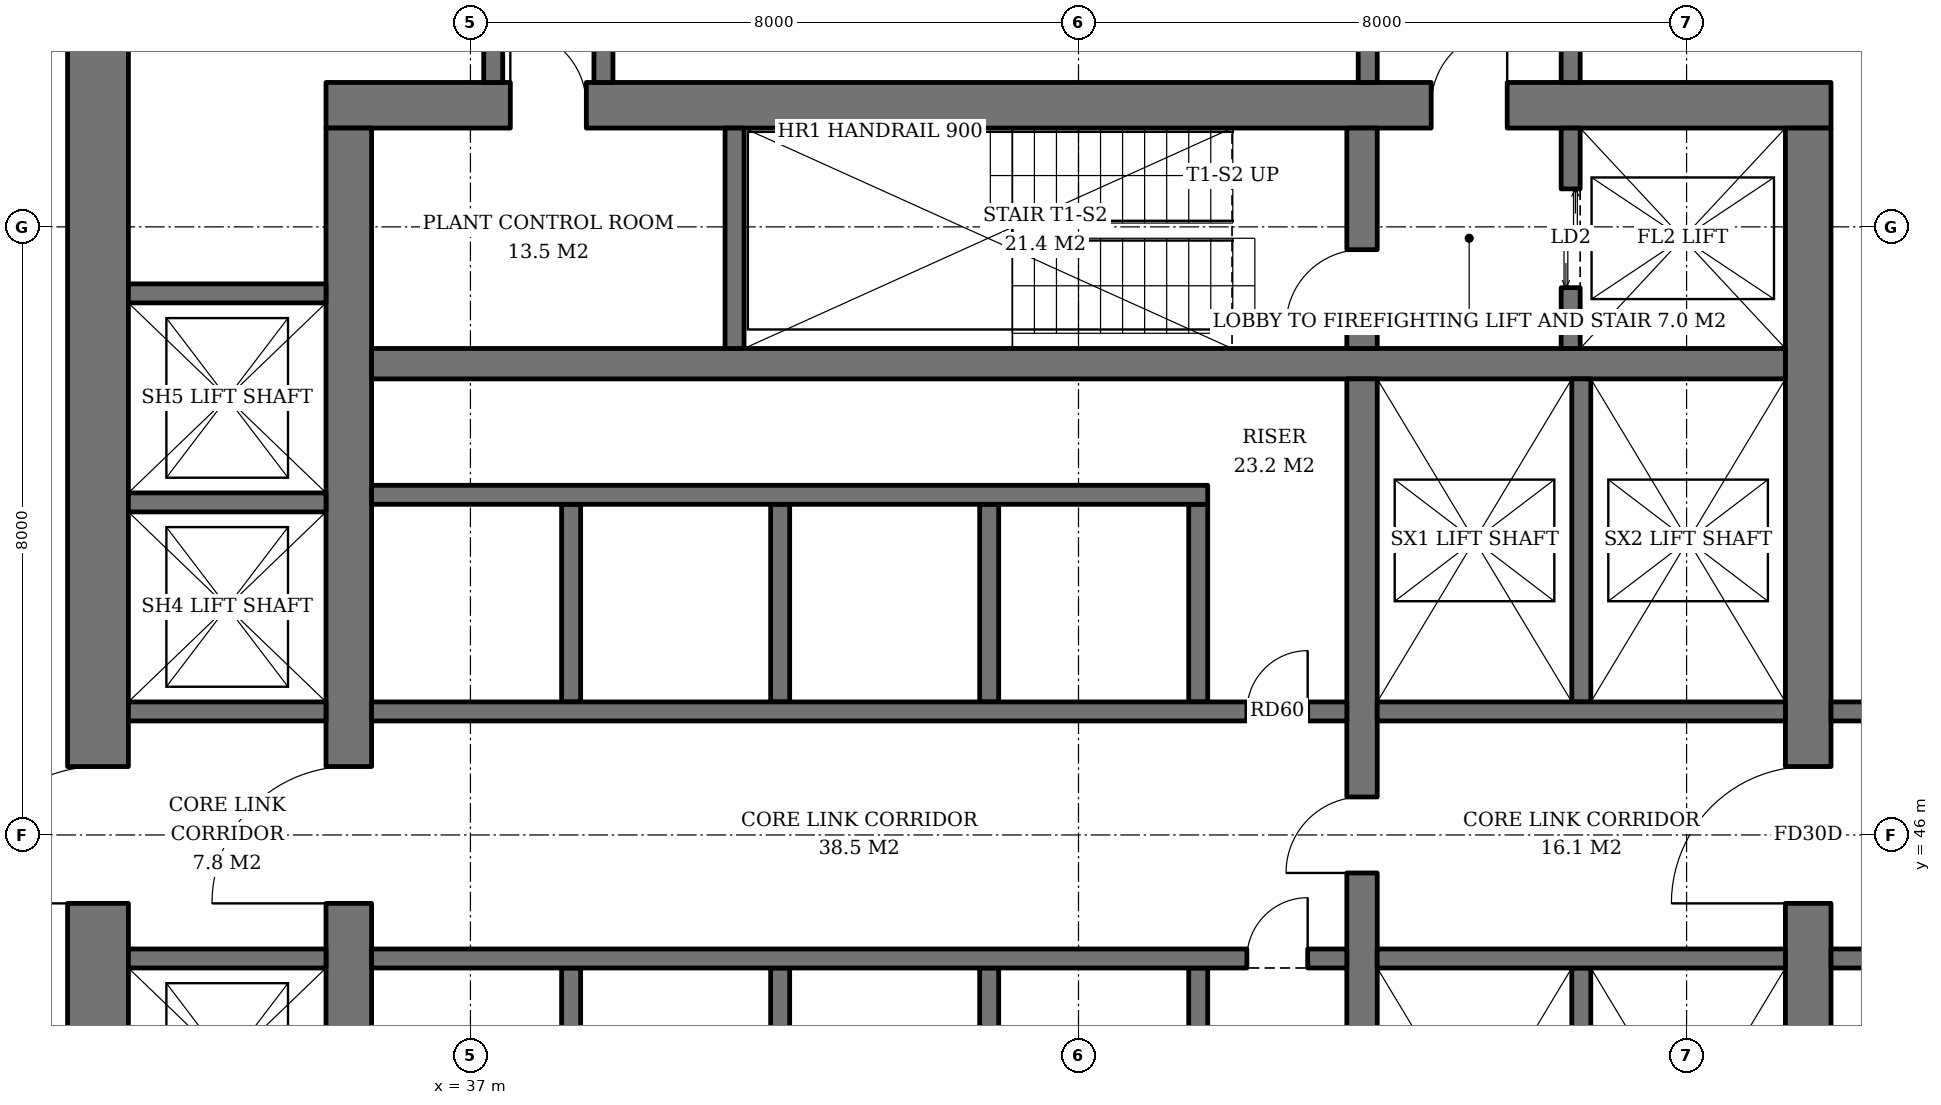
"""IFC4 building model, lengths in metres.
Left out: names, types, materials, properties, quantities, classifications, styles, units other than length and angle.
Written with IfcOpenShell. Run it as: python <this file> out.ifc"""

import sys

from ifc_helpers import new_model, si_unit, direction, frame, frame_2d, origin, place, context, subcontext, project, spatial, rectangle, extrude, element, fill, save


model = new_model("IFC4")
c1 = context("Model", 3, precision=1e-05, world=origin(), true_north=direction((0.0, 1.0)))
c2 = subcontext(c1, "Body", "Model", "MODEL_VIEW")
j1 = project(units=[si_unit("LENGTHUNIT", "METRE"), si_unit("PLANEANGLEUNIT", "RADIAN")], contexts=[c1])
p1 = place(None, origin())
s1 = spatial("IfcSite", under=j1, at=p1, CompositionType="ELEMENT")
p2 = place(p1, origin())
s2 = spatial("IfcBuilding", under=s1, at=p2, CompositionType="ELEMENT")
p3 = place(p2, frame((0.0, 0.0, 85.6)))
s3 = spatial("IfcBuildingStorey", under=s2, at=p3, CompositionType="ELEMENT", Elevation=85.6)
p4 = place(p3, frame((35.1, 55.6, 0.0), z_axis=(0.0, 0.0, 1.0), x_axis=(1.0, 0.0, 0.0)))
e1 = element("IfcWall", 1, at=p4, inside=s3, PredefinedType="SHEAR", context=c2, shape_type="SweptSolid", body=[
    extrude(rectangle(XDim=19.8, YDim=0.6, at=frame_2d((9.9, 0.0))), origin(), (0.0, 0.0, 1.0), 3.8),
])
p5 = place(p4, frame((14.54, 0.0, 0.0)))
e2 = element("IfcOpeningElement", 2, at=p5, cuts=e1, PredefinedType="OPENING", context=c2, shape_type="SweptSolid", body=[
    extrude(rectangle(XDim=1.0, YDim=2.1, at=frame_2d((0.5, 1.05))), frame((0.0, 0.31, 0.0), z_axis=(0.0, -1.0, 0.0), x_axis=(1.0, 0.0, 0.0)), (0.0, 0.0, 1.0), 0.62),
])
p6 = place(p4, frame((2.425, 0.0, 0.0)))
e3 = element("IfcOpeningElement", 3, at=p6, cuts=e1, PredefinedType="OPENING", context=c2, shape_type="SweptSolid", body=[
    extrude(rectangle(XDim=1.0, YDim=2.1, at=frame_2d((0.5, 1.05))), frame((0.0, 0.31, 0.0), z_axis=(0.0, -1.0, 0.0), x_axis=(1.0, 0.0, 0.0)), (0.0, 0.0, 1.0), 0.62),
])
p7 = place(p3, frame((35.4, 36.7, 0.0), z_axis=(0.0, 0.0, 1.0), x_axis=(0.0, 1.0, 0.0)))
e4 = element("IfcWall", 4, at=p7, inside=s3, PredefinedType="SHEAR", context=c2, shape_type="SweptSolid", body=[
    extrude(rectangle(XDim=18.6, YDim=0.6, at=frame_2d((9.3, 0.0))), origin(), (0.0, 0.0, 1.0), 3.8),
])
p8 = place(p7, frame((8.4, 0.0, 0.0)))
e5 = element("IfcOpeningElement", 5, at=p8, cuts=e4, PredefinedType="OPENING", context=c2, shape_type="SweptSolid", body=[
    extrude(rectangle(XDim=1.8, YDim=2.4, at=frame_2d((0.9, 1.2))), frame((0.0, 0.31, 0.0), z_axis=(0.0, -1.0, 0.0), x_axis=(1.0, 0.0, 0.0)), (0.0, 0.0, 1.0), 0.62),
])
p9 = place(p3, frame((54.6, 36.7, 0.0), z_axis=(0.0, 0.0, 1.0), x_axis=(0.0, 1.0, 0.0)))
e6 = element("IfcWall", 6, at=p9, inside=s3, PredefinedType="SHEAR", context=c2, shape_type="SweptSolid", body=[
    extrude(rectangle(XDim=18.6, YDim=0.6, at=frame_2d((9.3, 0.0))), origin(), (0.0, 0.0, 1.0), 3.8),
])
p10 = place(p9, frame((8.4, 0.0, 0.0)))
e7 = element("IfcOpeningElement", 7, at=p10, cuts=e6, PredefinedType="OPENING", context=c2, shape_type="SweptSolid", body=[
    extrude(rectangle(XDim=1.8, YDim=2.4, at=frame_2d((0.9, 1.2))), frame((0.0, 0.31, 0.0), z_axis=(0.0, -1.0, 0.0), x_axis=(1.0, 0.0, 0.0)), (0.0, 0.0, 1.0), 0.62),
])
p11 = place(p3, frame((32.1, 33.5, 0.0), z_axis=(0.0, 0.0, 1.0), x_axis=(0.0, 1.0, 0.0)))
e8 = element("IfcWall", 8, at=p11, inside=s3, PredefinedType="SHEAR", context=c2, shape_type="SweptSolid", body=[
    extrude(rectangle(XDim=25.0, YDim=0.8, at=frame_2d((12.5, 0.0))), origin(), (0.0, 0.0, 1.0), 3.8),
])
p12 = place(p11, frame((11.6, 0.0, 0.0)))
e9 = element("IfcOpeningElement", 9, at=p12, cuts=e8, PredefinedType="OPENING", context=c2, shape_type="SweptSolid", body=[
    extrude(rectangle(XDim=1.8, YDim=2.4, at=frame_2d((0.9, 1.2))), frame((0.0, 0.41, 0.0), z_axis=(0.0, -1.0, 0.0), x_axis=(1.0, 0.0, 0.0)), (0.0, 0.0, 1.0), 0.82),
])
p13 = place(p3, frame((35.7, 52.2, 0.0), z_axis=(0.0, 0.0, 1.0), x_axis=(1.0, 0.0, 0.0)))
e10 = element("IfcWall", 10, at=p13, inside=s3, PredefinedType="SHEAR", context=c2, shape_type="SweptSolid", body=[
    extrude(rectangle(XDim=18.6, YDim=0.4, at=frame_2d((9.3, 0.0))), origin(), (0.0, 0.0, 1.0), 3.8),
])
p14 = place(p3, frame((48.73, 40.0, 0.0), z_axis=(0.0, 0.0, 1.0), x_axis=(0.0, 1.0, 0.0)))
e11 = element("IfcWall", 11, at=p14, inside=s3, PredefinedType="SHEAR", context=c2, shape_type="SweptSolid", body=[
    extrude(rectangle(XDim=12.0, YDim=0.4, at=frame_2d((6.0, 0.0))), origin(), (0.0, 0.0, 1.0), 3.8),
])
p15 = place(p14, frame((5.5, 0.0, 0.0)))
e12 = element("IfcOpeningElement", 12, at=p15, cuts=e11, PredefinedType="OPENING", context=c2, shape_type="SweptSolid", body=[
    extrude(rectangle(XDim=1.0, YDim=2.1, at=frame_2d((0.5, 1.05))), frame((0.0, 0.21, 0.0), z_axis=(0.0, -1.0, 0.0), x_axis=(1.0, 0.0, 0.0)), (0.0, 0.0, 1.0), 0.42),
])
p16 = place(p3, frame((48.73, 52.4, 0.0), z_axis=(0.0, 0.0, 1.0), x_axis=(0.0, 1.0, 0.0)))
e13 = element("IfcWall", 13, at=p16, inside=s3, PredefinedType="SHEAR", context=c2, shape_type="SweptSolid", body=[
    extrude(rectangle(XDim=2.9, YDim=0.4, at=frame_2d((1.45, 0.0))), origin(), (0.0, 0.0, 1.0), 3.8),
])
p17 = place(p16, frame((0.3, 0.0, 0.0)))
e14 = element("IfcOpeningElement", 14, at=p17, cuts=e13, PredefinedType="OPENING", context=c2, shape_type="SweptSolid", body=[
    extrude(rectangle(XDim=1.0, YDim=2.1, at=frame_2d((0.5, 1.05))), frame((0.0, 0.21, 0.0), z_axis=(0.0, -1.0, 0.0), x_axis=(1.0, 0.0, 0.0)), (0.0, 0.0, 1.0), 0.42),
])
p18 = place(p3, frame((40.475, 52.4, 0.0), z_axis=(0.0, 0.0, 1.0), x_axis=(0.0, 1.0, 0.0)))
e15 = element("IfcWall", 15, at=p18, inside=s3, PredefinedType="SHEAR", context=c2, shape_type="SweptSolid", body=[
    extrude(rectangle(XDim=2.9, YDim=0.25, at=frame_2d((1.45, 0.0))), origin(), (0.0, 0.0, 1.0), 3.8),
])
p19 = place(p3, frame((51.475, 52.4, 0.0), z_axis=(0.0, 0.0, 1.0), x_axis=(0.0, 1.0, 0.0)))
e16 = element("IfcWall", 16, at=p19, inside=s3, PredefinedType="SHEAR", context=c2, shape_type="SweptSolid", body=[
    extrude(rectangle(XDim=2.9, YDim=0.25, at=frame_2d((1.45, 0.0))), origin(), (0.0, 0.0, 1.0), 3.8),
])
p20 = place(p19, frame((0.8, 0.0, 0.0)))
e17 = element("IfcOpeningElement", 17, at=p20, cuts=e16, PredefinedType="OPENING", context=c2, shape_type="SweptSolid", body=[
    extrude(rectangle(XDim=1.3, YDim=2.2, at=frame_2d((0.65, 1.1))), frame((0.0, 0.135, 0.0), z_axis=(0.0, -1.0, 0.0), x_axis=(1.0, 0.0, 0.0)), (0.0, 0.0, 1.0), 0.27),
])
for number, where, z_axis, x_axis in (
    (18, (38.325, 47.75, 0.0), (0.0, 0.0, 1.0), (0.0, 1.0, 0.0)),
    (19, (41.075, 47.75, 0.0), (0.0, 0.0, 1.0), (0.0, 1.0, 0.0)),
    (20, (43.825, 47.75, 0.0), (0.0, 0.0, 1.0), (0.0, 1.0, 0.0)),
    (21, (46.575, 47.75, 0.0), (0.0, 0.0, 1.0), (0.0, 1.0, 0.0)),
):
    element("IfcWall", number, at=place(p3, frame(where, z_axis=z_axis, x_axis=x_axis)), inside=s3, PredefinedType="SHEAR", context=c2, shape_type="SweptSolid", body=[
        extrude(rectangle(XDim=2.6, YDim=0.25, at=frame_2d((1.3, 0.0))), origin(), (0.0, 0.0, 1.0), 3.8),
    ])
p21 = place(p3, frame((35.7, 50.475, 0.0), z_axis=(0.0, 0.0, 1.0), x_axis=(1.0, 0.0, 0.0)))
e22 = element("IfcWall", 22, at=p21, inside=s3, PredefinedType="SHEAR", context=c2, shape_type="SweptSolid", body=[
    extrude(rectangle(XDim=11.0, YDim=0.25, at=frame_2d((5.5, 0.0))), origin(), (0.0, 0.0, 1.0), 3.8),
])
p22 = place(p3, frame((35.7, 47.625, 0.0), z_axis=(0.0, 0.0, 1.0), x_axis=(1.0, 0.0, 0.0)))
e23 = element("IfcWall", 23, at=p22, inside=s3, PredefinedType="SHEAR", context=c2, shape_type="SweptSolid", body=[
    extrude(rectangle(XDim=12.83, YDim=0.25, at=frame_2d((6.415, 0.0))), origin(), (0.0, 0.0, 1.0), 3.8),
])
p23 = place(p22, frame((11.515, 0.0, 0.0)))
e24 = element("IfcOpeningElement", 24, at=p23, cuts=e23, PredefinedType="OPENING", context=c2, shape_type="SweptSolid", body=[
    extrude(rectangle(XDim=0.8, YDim=2.0, at=frame_2d((0.4, 1.0))), frame((0.0, 0.135, 0.0), z_axis=(0.0, -1.0, 0.0), x_axis=(1.0, 0.0, 0.0)), (0.0, 0.0, 1.0), 0.27),
])
for number, where, z_axis, x_axis in (
    (25, (38.325, 44.25, 0.0), (0.0, 0.0, 1.0), (0.0, -1.0, 0.0)),
    (26, (41.075, 44.25, 0.0), (0.0, 0.0, 1.0), (0.0, -1.0, 0.0)),
    (27, (43.825, 44.25, 0.0), (0.0, 0.0, 1.0), (0.0, -1.0, 0.0)),
    (28, (46.575, 44.25, 0.0), (0.0, 0.0, 1.0), (0.0, -1.0, 0.0)),
):
    element("IfcWall", number, at=place(p3, frame(where, z_axis=z_axis, x_axis=x_axis)), inside=s3, PredefinedType="SHEAR", context=c2, shape_type="SweptSolid", body=[
        extrude(rectangle(XDim=2.6, YDim=0.25, at=frame_2d((1.3, 0.0))), origin(), (0.0, 0.0, 1.0), 3.8),
    ])
p24 = place(p3, frame((35.7, 44.375, 0.0), z_axis=(0.0, 0.0, 1.0), x_axis=(1.0, 0.0, 0.0)))
e29 = element("IfcWall", 29, at=p24, inside=s3, PredefinedType="SHEAR", context=c2, shape_type="SweptSolid", body=[
    extrude(rectangle(XDim=12.83, YDim=0.25, at=frame_2d((6.415, 0.0))), origin(), (0.0, 0.0, 1.0), 3.8),
])
p25 = place(p24, frame((11.515, 0.0, 0.0)))
e30 = element("IfcOpeningElement", 30, at=p25, cuts=e29, PredefinedType="OPENING", context=c2, shape_type="SweptSolid", body=[
    extrude(rectangle(XDim=0.8, YDim=2.0, at=frame_2d((0.4, 1.0))), frame((0.0, 0.135, 0.0), z_axis=(0.0, -1.0, 0.0), x_axis=(1.0, 0.0, 0.0)), (0.0, 0.0, 1.0), 0.27),
])
p26 = place(p3, frame((51.615, 47.75, 0.0), z_axis=(0.0, 0.0, 1.0), x_axis=(0.0, 1.0, 0.0)))
e31 = element("IfcWall", 31, at=p26, inside=s3, PredefinedType="SHEAR", context=c2, shape_type="SweptSolid", body=[
    extrude(rectangle(XDim=4.25, YDim=0.25, at=frame_2d((2.125, 0.0))), origin(), (0.0, 0.0, 1.0), 3.8),
])
p27 = place(p3, frame((48.93, 47.625, 0.0), z_axis=(0.0, 0.0, 1.0), x_axis=(1.0, 0.0, 0.0)))
e32 = element("IfcWall", 32, at=p27, inside=s3, PredefinedType="SHEAR", context=c2, shape_type="SweptSolid", body=[
    extrude(rectangle(XDim=5.37, YDim=0.25, at=frame_2d((2.685, 0.0))), origin(), (0.0, 0.0, 1.0), 3.8),
])
p28 = place(p3, frame((51.615, 44.25, 0.0), z_axis=(0.0, 0.0, 1.0), x_axis=(0.0, -1.0, 0.0)))
e33 = element("IfcWall", 33, at=p28, inside=s3, PredefinedType="SHEAR", context=c2, shape_type="SweptSolid", body=[
    extrude(rectangle(XDim=4.25, YDim=0.25, at=frame_2d((2.125, 0.0))), origin(), (0.0, 0.0, 1.0), 3.8),
])
p29 = place(p3, frame((48.93, 44.375, 0.0), z_axis=(0.0, 0.0, 1.0), x_axis=(1.0, 0.0, 0.0)))
e34 = element("IfcWall", 34, at=p29, inside=s3, PredefinedType="SHEAR", context=c2, shape_type="SweptSolid", body=[
    extrude(rectangle(XDim=5.37, YDim=0.25, at=frame_2d((2.685, 0.0))), origin(), (0.0, 0.0, 1.0), 3.8),
])
for number, where, z_axis, x_axis in (
    (35, (32.5, 44.375, 0.0), (0.0, 0.0, 1.0), (1.0, 0.0, 0.0)),
    (36, (32.5, 47.625, 0.0), (0.0, 0.0, 1.0), (1.0, 0.0, 0.0)),
    (37, (32.5, 50.375, 0.0), (0.0, 0.0, 1.0), (1.0, 0.0, 0.0)),
    (38, (32.5, 53.125, 0.0), (0.0, 0.0, 1.0), (1.0, 0.0, 0.0)),
):
    element("IfcWall", number, at=place(p3, frame(where, z_axis=z_axis, x_axis=x_axis)), inside=s3, PredefinedType="SHEAR", context=c2, shape_type="SweptSolid", body=[
        extrude(rectangle(XDim=2.6, YDim=0.25, at=frame_2d((1.3, 0.0))), origin(), (0.0, 0.0, 1.0), 3.8),
    ])
p30 = place(p3, frame((48.805, 55.9, 0.0), z_axis=(0.0, 0.0, 1.0), x_axis=(0.0, 1.0, 0.0)))
e39 = element("IfcWall", 39, at=p30, inside=s3, PredefinedType="SOLIDWALL", context=c2, shape_type="SweptSolid", body=[
    extrude(rectangle(XDim=2.6, YDim=0.25, at=frame_2d((1.3, 0.0))), origin(), (0.0, 0.0, 1.0), 3.6),
])
p31 = place(p30, frame((0.8, 0.0, 0.0)))
e40 = element("IfcOpeningElement", 40, at=p31, cuts=e39, PredefinedType="OPENING", context=c2, shape_type="SweptSolid", body=[
    extrude(rectangle(XDim=1.0, YDim=2.1, at=frame_2d((0.5, 1.05))), frame((0.0, 0.135, 0.0), z_axis=(0.0, -1.0, 0.0), x_axis=(1.0, 0.0, 0.0)), (0.0, 0.0, 1.0), 0.27),
])
p32 = place(p3, frame((51.475, 55.9, 0.0), z_axis=(0.0, 0.0, 1.0), x_axis=(0.0, 1.0, 0.0)))
e41 = element("IfcWall", 41, at=p32, inside=s3, PredefinedType="SOLIDWALL", context=c2, shape_type="SweptSolid", body=[
    extrude(rectangle(XDim=2.6, YDim=0.25, at=frame_2d((1.3, 0.0))), origin(), (0.0, 0.0, 1.0), 3.6),
])
p33 = place(p32, frame((0.8, 0.0, 0.0)))
e42 = element("IfcOpeningElement", 42, at=p33, cuts=e41, PredefinedType="OPENING", context=c2, shape_type="SweptSolid", body=[
    extrude(rectangle(XDim=1.0, YDim=2.1, at=frame_2d((0.5, 1.05))), frame((0.0, 0.135, 0.0), z_axis=(0.0, -1.0, 0.0), x_axis=(1.0, 0.0, 0.0)), (0.0, 0.0, 1.0), 0.27),
])
p34 = place(p3, frame((54.9, 44.375, 0.0), z_axis=(0.0, 0.0, 1.0), x_axis=(1.0, 0.0, 0.0)))
e43 = element("IfcWall", 43, at=p34, inside=s3, PredefinedType="SOLIDWALL", context=c2, shape_type="SweptSolid", body=[
    extrude(rectangle(XDim=2.6, YDim=0.25, at=frame_2d((1.3, 0.0))), origin(), (0.0, 0.0, 1.0), 3.6),
])
p35 = place(p34, frame((0.8, 0.0, 0.0)))
e44 = element("IfcOpeningElement", 44, at=p35, cuts=e43, PredefinedType="OPENING", context=c2, shape_type="SweptSolid", body=[
    extrude(rectangle(XDim=1.0, YDim=2.1, at=frame_2d((0.5, 1.05))), frame((0.0, 0.135, 0.0), z_axis=(0.0, -1.0, 0.0), x_axis=(1.0, 0.0, 0.0)), (0.0, 0.0, 1.0), 0.27),
])
p36 = place(p3, frame((54.9, 47.625, 0.0), z_axis=(0.0, 0.0, 1.0), x_axis=(1.0, 0.0, 0.0)))
e45 = element("IfcWall", 45, at=p36, inside=s3, PredefinedType="SOLIDWALL", context=c2, shape_type="SweptSolid", body=[
    extrude(rectangle(XDim=2.6, YDim=0.25, at=frame_2d((1.3, 0.0))), origin(), (0.0, 0.0, 1.0), 3.6),
])
p37 = place(p36, frame((0.8, 0.0, 0.0)))
e46 = element("IfcOpeningElement", 46, at=p37, cuts=e45, PredefinedType="OPENING", context=c2, shape_type="SweptSolid", body=[
    extrude(rectangle(XDim=1.0, YDim=2.1, at=frame_2d((0.5, 1.05))), frame((0.0, 0.135, 0.0), z_axis=(0.0, -1.0, 0.0), x_axis=(1.0, 0.0, 0.0)), (0.0, 0.0, 1.0), 0.27),
])
p38 = place(p3, frame((37.3, 55.9, 0.0), z_axis=(0.0, 0.0, 1.0), x_axis=(0.0, 1.0, 0.0)))
e47 = element("IfcWall", 47, at=p38, inside=s3, PredefinedType="SOLIDWALL", context=c2, shape_type="SweptSolid", body=[
    extrude(rectangle(XDim=2.6, YDim=0.25, at=frame_2d((1.3, 0.0))), origin(), (0.0, 0.0, 1.0), 3.6),
])
p39 = place(p3, frame((38.75, 55.9, 0.0), z_axis=(0.0, 0.0, 1.0), x_axis=(0.0, 1.0, 0.0)))
e48 = element("IfcWall", 48, at=p39, inside=s3, PredefinedType="SOLIDWALL", context=c2, shape_type="SweptSolid", body=[
    extrude(rectangle(XDim=2.6, YDim=0.25, at=frame_2d((1.3, 0.0))), origin(), (0.0, 0.0, 1.0), 3.6),
])
p40 = place(p39, frame((0.8, 0.0, 0.0)))
e49 = element("IfcOpeningElement", 49, at=p40, cuts=e48, PredefinedType="OPENING", context=c2, shape_type="SweptSolid", body=[
    extrude(rectangle(XDim=1.0, YDim=2.1, at=frame_2d((0.5, 1.05))), frame((0.0, 0.135, 0.0), z_axis=(0.0, -1.0, 0.0), x_axis=(1.0, 0.0, 0.0)), (0.0, 0.0, 1.0), 0.27),
])
p41 = place(p20, origin())
e50 = element("IfcDoor", 50, at=p41, inside=s3, OperationType="DOUBLE_DOOR_SLIDING", PredefinedType="DOOR", context=c2, shape_type="SweptSolid", body=[
    extrude(rectangle(XDim=1.3, YDim=2.2, at=frame_2d((0.65, 1.1))), frame((0.0, 0.025, 0.0), z_axis=(0.0, -1.0, 0.0), x_axis=(1.0, 0.0, 0.0)), (0.0, 0.0, 1.0), 0.05),
])
fill(e17, e50)
p42 = place(p23, origin())
e51 = element("IfcDoor", 51, at=p42, inside=s3, OperationType="SINGLE_SWING_RIGHT", PredefinedType="DOOR", context=c2, shape_type="SweptSolid", body=[
    extrude(rectangle(XDim=0.8, YDim=2.0, at=frame_2d((0.4, 1.0))), frame((0.0, 0.025, 0.0), z_axis=(0.0, -1.0, 0.0), x_axis=(1.0, 0.0, 0.0)), (0.0, 0.0, 1.0), 0.05),
])
fill(e24, e51)
p43 = place(p25, origin())
e52 = element("IfcDoor", 52, at=p43, inside=s3, OperationType="SINGLE_SWING_RIGHT", PredefinedType="DOOR", context=c2, shape_type="SweptSolid", body=[
    extrude(rectangle(XDim=0.8, YDim=2.0, at=frame_2d((0.4, 1.0))), frame((0.0, 0.025, 0.0), z_axis=(0.0, -1.0, 0.0), x_axis=(1.0, 0.0, 0.0)), (0.0, 0.0, 1.0), 0.05),
])
fill(e30, e52)
p44 = place(p15, origin())
e53 = element("IfcDoor", 53, at=p44, inside=s3, OperationType="SINGLE_SWING_LEFT", PredefinedType="DOOR", context=c2, shape_type="SweptSolid", body=[
    extrude(rectangle(XDim=1.0, YDim=2.1, at=frame_2d((0.5, 1.05))), frame((0.0, 0.025, 0.0), z_axis=(0.0, -1.0, 0.0), x_axis=(1.0, 0.0, 0.0)), (0.0, 0.0, 1.0), 0.05),
])
fill(e12, e53)
p45 = place(p17, origin())
e54 = element("IfcDoor", 54, at=p45, inside=s3, OperationType="SINGLE_SWING_LEFT", PredefinedType="DOOR", context=c2, shape_type="SweptSolid", body=[
    extrude(rectangle(XDim=1.0, YDim=2.1, at=frame_2d((0.5, 1.05))), frame((0.0, 0.025, 0.0), z_axis=(0.0, -1.0, 0.0), x_axis=(1.0, 0.0, 0.0)), (0.0, 0.0, 1.0), 0.05),
])
fill(e14, e54)
p46 = place(p5, origin())
e55 = element("IfcDoor", 55, at=p46, inside=s3, OperationType="SINGLE_SWING_RIGHT", PredefinedType="DOOR", context=c2, shape_type="SweptSolid", body=[
    extrude(rectangle(XDim=1.0, YDim=2.1, at=frame_2d((0.5, 1.05))), frame((0.0, 0.025, 0.0), z_axis=(0.0, -1.0, 0.0), x_axis=(1.0, 0.0, 0.0)), (0.0, 0.0, 1.0), 0.05),
])
fill(e2, e55)
p47 = place(p8, origin())
e56 = element("IfcDoor", 56, at=p47, inside=s3, OperationType="DOUBLE_DOOR_SINGLE_SWING", PredefinedType="DOOR", context=c2, shape_type="SweptSolid", body=[
    extrude(rectangle(XDim=1.8, YDim=2.4, at=frame_2d((0.9, 1.2))), frame((0.0, 0.025, 0.0), z_axis=(0.0, -1.0, 0.0), x_axis=(1.0, 0.0, 0.0)), (0.0, 0.0, 1.0), 0.05),
])
fill(e5, e56)
p48 = place(p10, origin())
e57 = element("IfcDoor", 57, at=p48, inside=s3, OperationType="DOUBLE_DOOR_SINGLE_SWING", PredefinedType="DOOR", context=c2, shape_type="SweptSolid", body=[
    extrude(rectangle(XDim=1.8, YDim=2.4, at=frame_2d((0.9, 1.2))), frame((0.0, 0.025, 0.0), z_axis=(0.0, -1.0, 0.0), x_axis=(1.0, 0.0, 0.0)), (0.0, 0.0, 1.0), 0.05),
])
fill(e7, e57)
p49 = place(p12, origin())
e58 = element("IfcDoor", 58, at=p49, inside=s3, OperationType="DOUBLE_DOOR_SINGLE_SWING", PredefinedType="DOOR", context=c2, shape_type="SweptSolid", body=[
    extrude(rectangle(XDim=1.8, YDim=2.4, at=frame_2d((0.9, 1.2))), frame((0.0, 0.025, 0.0), z_axis=(0.0, -1.0, 0.0), x_axis=(1.0, 0.0, 0.0)), (0.0, 0.0, 1.0), 0.05),
])
fill(e9, e58)
p50 = place(p6, origin())
e59 = element("IfcDoor", 59, at=p50, inside=s3, OperationType="SINGLE_SWING_LEFT", PredefinedType="DOOR", context=c2, shape_type="SweptSolid", body=[
    extrude(rectangle(XDim=1.0, YDim=2.1, at=frame_2d((0.5, 1.05))), frame((0.0, -0.24, 0.0), z_axis=(0.0, -1.0, 0.0), x_axis=(1.0, 0.0, 0.0)), (0.0, 0.0, 1.0), 0.05),
])
fill(e3, e59)
save(model, sys.argv[1])
